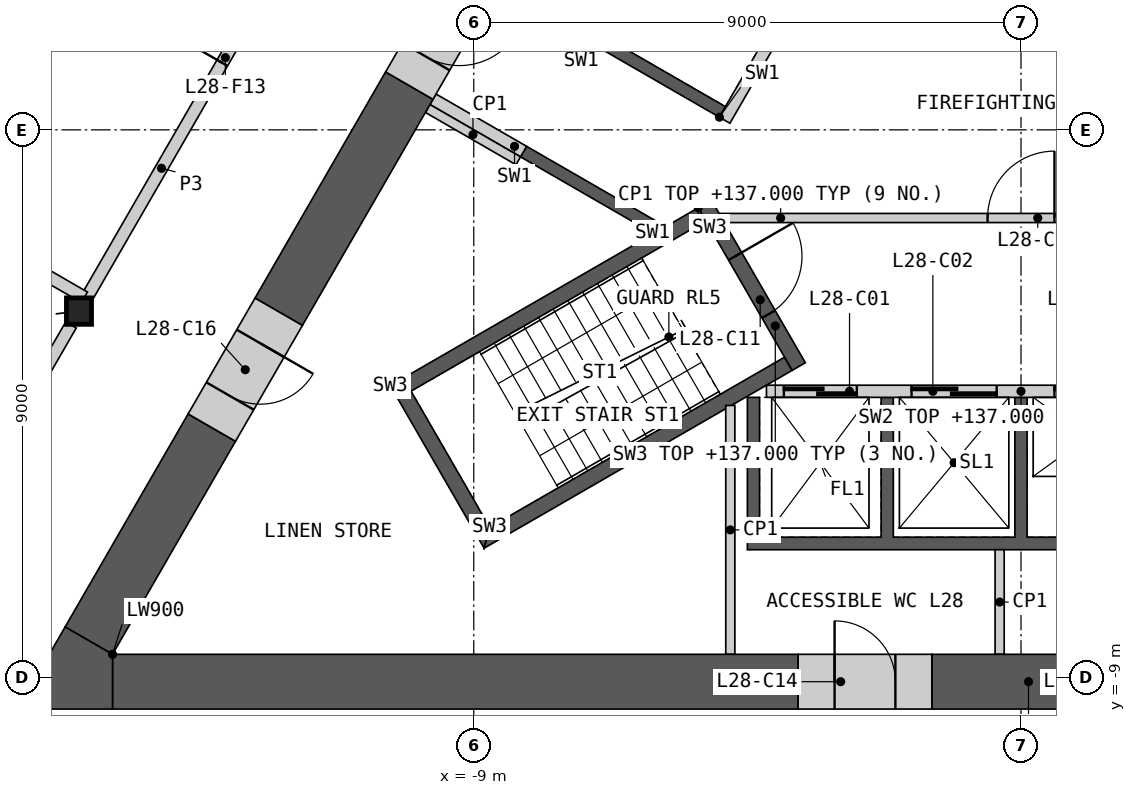
"""IFC4 building model, lengths in metres.
Left out: names, types, materials, properties, quantities, classifications, styles, units other than length and angle.
Written with IfcOpenShell. Run it as: python <this file> out.ifc"""

import sys

from ifc_helpers import new_model, si_unit, direction, frame, frame_2d, origin, origin_2d, place, context, subcontext, project, spatial, polyline, rectangle, i_section, outline, extrude, element, fill, save


model = new_model("IFC4")
c1 = context("Model", 3, precision=1e-05, world=origin(), true_north=direction((0.0, 1.0)))
c2 = subcontext(c1, "Body", "Model", "MODEL_VIEW")
j1 = project(units=[si_unit("LENGTHUNIT", "METRE"), si_unit("PLANEANGLEUNIT", "RADIAN")], contexts=[c1])
p1 = place(None, origin())
s1 = spatial("IfcSite", under=j1, at=p1, CompositionType="ELEMENT")
p2 = place(p1, origin())
s2 = spatial("IfcBuilding", under=s1, at=p2, CompositionType="ELEMENT")
p3 = place(p2, frame((0.0, 0.0, 133.2)))
s3 = spatial("IfcBuildingStorey", under=s2, at=p3, CompositionType="ELEMENT", Elevation=133.2)
p4 = place(p3, frame((-15.493, -2.982, 0.0), z_axis=(0.0, 0.0, 1.0), x_axis=(1.0, 0.0, 0.0)))
e1 = element("IfcColumn", 1, at=p4, inside=s3, PredefinedType="COLUMN", context=c2, shape_type="SweptSolid", body=[
    extrude(i_section(OverallWidth=0.412, OverallDepth=0.435, WebThickness=0.036, FlangeThickness=0.057, at=origin_2d()), origin(), (0.0, 0.0, 1.0), 4.2),
])
p5 = place(p3, origin())
e2 = element("IfcWall", 2, at=p5, inside=s3, PredefinedType="SHEAR", context=c2, shape_type="SweptSolid", body=[
    extrude(outline(polyline([(4.5, -4.4), (4.5, -6.906), (-4.5, -6.906), (-4.5, -4.4), (-4.3, -4.4), (-4.3, -6.7), (-2.3, -6.7), (-2.3, -4.4), (-2.1, -4.4), (-2.1, -6.7), (-0.1, -6.7), (-0.1, -4.4), (0.1, -4.4), (0.1, -6.7), (2.1, -6.7), (2.1, -4.4), (2.3, -4.4), (2.3, -6.7), (4.3, -6.7), (4.3, -4.4), (4.5, -4.4)])), origin(), (0.0, 0.0, 1.0), 3.8),
])
p6 = place(p3, frame((-4.187, -4.3, 0.0), z_axis=(0.0, 0.0, 1.0), x_axis=(1.0, 0.0, 0.0)))
e3 = element("IfcWall", 3, at=p6, inside=s3, PredefinedType="SOLIDWALL", context=c2, shape_type="SweptSolid", body=[
    extrude(rectangle(XDim=8.373, YDim=0.2, at=frame_2d((4.187, 0.0))), origin(), (0.0, 0.0, 1.0), 3.8),
])
p7 = place(p6, frame((0.287, 0.0, 0.0)))
e4 = element("IfcOpeningElement", 4, at=p7, cuts=e3, PredefinedType="OPENING", context=c2, shape_type="SweptSolid", body=[
    extrude(rectangle(XDim=1.2, YDim=2.1, at=frame_2d((0.6, 1.05))), frame((0.0, 0.11, 0.0), z_axis=(0.0, -1.0, 0.0), x_axis=(1.0, 0.0, 0.0)), (0.0, 0.0, 1.0), 0.22),
])
p8 = place(p6, frame((2.387, 0.0, 0.0)))
e5 = element("IfcOpeningElement", 5, at=p8, cuts=e3, PredefinedType="OPENING", context=c2, shape_type="SweptSolid", body=[
    extrude(rectangle(XDim=1.4, YDim=2.1, at=frame_2d((0.7, 1.05))), frame((0.0, 0.11, 0.0), z_axis=(0.0, -1.0, 0.0), x_axis=(1.0, 0.0, 0.0)), (0.0, 0.0, 1.0), 0.22),
])
p9 = place(p6, frame((4.737, 0.0, 0.0)))
e6 = element("IfcOpeningElement", 6, at=p9, cuts=e3, PredefinedType="OPENING", context=c2, shape_type="SweptSolid", body=[
    extrude(rectangle(XDim=1.1, YDim=2.1, at=frame_2d((0.55, 1.05))), frame((0.0, 0.11, 0.0), z_axis=(0.0, -1.0, 0.0), x_axis=(1.0, 0.0, 0.0)), (0.0, 0.0, 1.0), 0.22),
])
p10 = place(p6, frame((6.887, 0.0, 0.0)))
e7 = element("IfcOpeningElement", 7, at=p10, cuts=e3, PredefinedType="OPENING", context=c2, shape_type="SweptSolid", body=[
    extrude(rectangle(XDim=1.2, YDim=2.1, at=frame_2d((0.6, 1.05))), frame((0.0, 0.11, 0.0), z_axis=(0.0, -1.0, 0.0), x_axis=(1.0, 0.0, 0.0)), (0.0, 0.0, 1.0), 0.22),
])
p11 = place(p3, origin())
e8 = element("IfcWall", 8, at=p11, inside=s3, PredefinedType="SHEAR", context=c2, shape_type="SweptSolid", body=[
    extrude(outline(polyline([(-6.061, -1.697), (-8.231, -0.444), (-8.131, -0.271), (-5.96, -1.524), (-6.061, -1.697)])), origin(), (0.0, 0.0, 1.0), 3.8),
])
p12 = place(p3, origin())
e9 = element("IfcWall", 9, at=p12, inside=s3, PredefinedType="SHEAR", context=c2, shape_type="SweptSolid", body=[
    extrude(outline(polyline([(-4.96, 0.208), (-7.131, 1.461), (-3.731, 7.35), (-1.561, 6.097), (-1.66, 5.924), (-3.652, 7.074), (-5.752, 3.437), (-3.76, 2.287), (-3.861, 2.113), (-5.852, 3.263), (-6.852, 1.531), (-4.861, 0.381), (-4.96, 0.208)])), origin(), (0.0, 0.0, 1.0), 3.8),
])
p13 = place(p3, frame((-1.631, 5.776, 0.0), z_axis=(0.0, 0.0, 1.0), x_axis=(-0.499992876559, -0.866029516466, 0.0)))
e10 = element("IfcWall", 10, at=p13, inside=s3, PredefinedType="SOLIDWALL", context=c2, shape_type="SweptSolid", body=[
    extrude(rectangle(XDim=6.486, YDim=0.2, at=frame_2d((3.243, 0.0))), origin(), (0.0, 0.0, 1.0), 3.8),
])
p14 = place(p13, frame((1.537, 0.0, 0.0)))
e11 = element("IfcOpeningElement", 11, at=p14, cuts=e10, PredefinedType="OPENING", context=c2, shape_type="SweptSolid", body=[
    extrude(rectangle(XDim=0.9, YDim=2.1, at=frame_2d((0.45, 1.05))), frame((0.0, 0.11, 0.0), z_axis=(0.0, -1.0, 0.0), x_axis=(1.0, 0.0, 0.0)), (0.0, 0.0, 1.0), 0.22),
])
p15 = place(p3, frame((-8.181, -0.357, 0.0), z_axis=(0.0, 0.0, 1.0), x_axis=(-0.866024871741, 0.500000921525, 0.0)))
e12 = element("IfcWall", 12, at=p15, inside=s3, PredefinedType="SHEAR", context=c2, shape_type="SweptSolid", body=[
    extrude(rectangle(XDim=1.72, YDim=0.2, at=frame_2d((0.86, 0.0))), origin(), (0.0, 0.0, 1.0), 3.8),
])
p16 = place(p3, frame((-4.941, -1.45, 0.0), z_axis=(0.0, 0.0, 1.0), x_axis=(1.0, 0.0, 0.0)))
e13 = element("IfcWall", 13, at=p16, inside=s3, PredefinedType="PARTITIONING", context=c2, shape_type="SweptSolid", body=[
    extrude(rectangle(XDim=9.882, YDim=0.15, at=frame_2d((4.941, 0.0))), origin(), (0.0, 0.0, 1.0), 3.8),
])
p17 = place(p16, frame((4.391, 0.0, 0.0)))
e14 = element("IfcOpeningElement", 14, at=p17, cuts=e13, PredefinedType="OPENING", context=c2, shape_type="SweptSolid", body=[
    extrude(rectangle(XDim=1.1, YDim=2.1, at=frame_2d((0.55, 1.05))), frame((0.0, 0.085, 0.0), z_axis=(0.0, -1.0, 0.0), x_axis=(1.0, 0.0, 0.0)), (0.0, 0.0, 1.0), 0.17),
])
p18 = place(p3, origin())
e15 = element("IfcWall", 15, at=p18, inside=s3, PredefinedType="SHEAR", context=c2, shape_type="SweptSolid", body=[
    extrude(outline(polyline([(-5.307, -1.281), (-10.374, -4.206), (-10.032, -4.298), (-5.182, -1.498), (-5.307, -1.281)])), origin(), (0.0, 0.0, 1.0), 3.8),
])
p19 = place(p3, origin())
e16 = element("IfcWall", 16, at=p19, inside=s3, PredefinedType="SHEAR", context=c2, shape_type="SweptSolid", body=[
    extrude(outline(polyline([(-10.374, -4.206), (-8.83, -6.881), (-8.738, -6.539), (-10.032, -4.298), (-10.374, -4.206)])), origin(), (0.0, 0.0, 1.0), 3.8),
])
p20 = place(p3, origin())
e17 = element("IfcWall", 17, at=p20, inside=s3, PredefinedType="SHEAR", context=c2, shape_type="SweptSolid", body=[
    extrude(outline(polyline([(-8.738, -6.539), (-8.83, -6.881), (-3.763, -3.956), (-3.888, -3.739), (-8.738, -6.539)])), origin(), (0.0, 0.0, 1.0), 3.8),
])
p21 = place(p3, frame((-5.199, -1.219, 0.0), z_axis=(0.0, 0.0, 1.0), x_axis=(0.499982516597, -0.866035497597, 0.0)))
e18 = element("IfcWall", 18, at=p21, inside=s3, PredefinedType="SHEAR", context=c2, shape_type="SweptSolid", body=[
    extrude(rectangle(XDim=3.088, YDim=0.25, at=frame_2d((1.544, 0.0))), origin(), (0.0, 0.0, 1.0), 3.8),
])
p22 = place(p21, frame((0.994, 0.0, 0.0)))
e19 = element("IfcOpeningElement", 19, at=p22, cuts=e18, PredefinedType="OPENING", context=c2, shape_type="SweptSolid", body=[
    extrude(rectangle(XDim=1.1, YDim=2.1, at=frame_2d((0.55, 1.05))), frame((0.0, 0.135, 0.0), z_axis=(0.0, -1.0, 0.0), x_axis=(1.0, 0.0, 0.0)), (0.0, 0.0, 1.0), 0.27),
])
for number, where, z_axis, x_axis in (
    (20, (-8.268, -0.509, 0.0), (0.0, 0.0, 1.0), (-0.866, 0.5, 0.0)),
    (21, (-0.351, -8.626, 0.0), (0.0, 0.0, 1.0), (0.0, 1.0, 0.0)),
):
    element("IfcWall", number, at=place(p3, frame(where, z_axis=z_axis, x_axis=x_axis)), inside=s3, PredefinedType="PARTITIONING", context=c2, shape_type="SweptSolid", body=[
        extrude(rectangle(XDim=1.72, YDim=0.15, at=frame_2d((0.86, 0.0))), origin(), (0.0, 0.0, 1.0), 3.8),
    ])
p23 = place(p3, frame((-4.781, -8.626, 0.0), z_axis=(0.0, 0.0, 1.0), x_axis=(0.0, 1.0, 0.0)))
e22 = element("IfcWall", 22, at=p23, inside=s3, PredefinedType="PARTITIONING", context=c2, shape_type="SweptSolid", body=[
    extrude(rectangle(XDim=4.093, YDim=0.15, at=frame_2d((2.047, 0.0))), origin(), (0.0, 0.0, 1.0), 3.8),
])
p24 = place(p3, frame((-14.941, -9.076, 0.0), z_axis=(0.0, 0.0, 1.0), x_axis=(1.0, 0.0, 0.0)))
e23 = element("IfcWall", 23, at=p24, inside=s3, PredefinedType="SHEAR", context=c2, shape_type="SweptSolid", body=[
    extrude(rectangle(XDim=11.275, YDim=0.9, at=frame_2d((5.638, 0.0))), origin(), (0.0, 0.0, 1.0), 3.8),
])
p25 = place(p3, frame((-1.466, -9.076, 0.0), z_axis=(0.0, 0.0, 1.0), x_axis=(1.0, 0.0, 0.0)))
e24 = element("IfcWall", 24, at=p25, inside=s3, PredefinedType="SHEAR", context=c2, shape_type="SweptSolid", body=[
    extrude(rectangle(XDim=3.179, YDim=0.9, at=frame_2d((1.589, 0.0))), origin(), (0.0, 0.0, 1.0), 3.8),
])
p26 = place(p3, frame((-10.06, 0.728, 0.0), z_axis=(0.0, 0.0, 1.0), x_axis=(-0.499996331799, -0.866027521611, 0.0)))
e25 = element("IfcWall", 25, at=p26, inside=s3, PredefinedType="SHEAR", context=c2, shape_type="SweptSolid", body=[
    extrude(rectangle(XDim=4.295, YDim=0.9, at=frame_2d((2.148, 0.0))), origin(), (0.0, 0.0, 1.0), 3.8),
])
p27 = place(p3, frame((-13.308, -4.898, 0.0), z_axis=(0.0, 0.0, 1.0), x_axis=(-0.499974938593, -0.866039872511, 0.0)))
e26 = element("IfcWall", 26, at=p27, inside=s3, PredefinedType="SHEAR", context=c2, shape_type="SweptSolid", body=[
    extrude(rectangle(XDim=4.046, YDim=0.9, at=frame_2d((2.023, 0.0))), origin(), (0.0, 0.0, 1.0), 3.8),
])
p28 = place(p3, origin())
e27 = element("IfcWall", 27, at=p28, inside=s3, PredefinedType="SHEAR", context=c2, shape_type="SweptSolid", body=[
    extrude(outline(polyline([(-14.941, -8.626), (-14.941, -9.526), (-16.5, -9.526), (-15.721, -8.176), (-14.941, -8.626)])), origin(), (0.0, 0.0, 1.0), 3.8),
])
p29 = place(p3, frame((-3.666, -9.076, 0.0), z_axis=(0.0, 0.0, 1.0), x_axis=(1.0, 0.0, 0.0)))
e28 = element("IfcWall", 28, at=p29, inside=s3, PredefinedType="SHEAR", context=c2, shape_type="SweptSolid", body=[
    extrude(rectangle(XDim=2.2, YDim=0.9, at=frame_2d((1.1, 0.0))), origin(), (0.0, 0.0, 1.0), 3.8),
])
p30 = place(p29, frame((0.6, 0.0, 0.0)))
e29 = element("IfcOpeningElement", 29, at=p30, cuts=e28, PredefinedType="OPENING", context=c2, shape_type="SweptSolid", body=[
    extrude(rectangle(XDim=1.0, YDim=2.1, at=frame_2d((0.5, 1.05))), frame((0.0, 0.46, 0.0), z_axis=(0.0, -1.0, 0.0), x_axis=(1.0, 0.0, 0.0)), (0.0, 0.0, 1.0), 0.92),
])
p31 = place(p3, frame((-12.208, -2.992, 0.0), z_axis=(0.0, 0.0, 1.0), x_axis=(-0.50002983664, -0.866008176907, 0.0)))
e30 = element("IfcWall", 30, at=p31, inside=s3, PredefinedType="SHEAR", context=c2, shape_type="SweptSolid", body=[
    extrude(rectangle(XDim=2.2, YDim=0.9, at=frame_2d((1.1, 0.0))), origin(), (0.0, 0.0, 1.0), 3.8),
])
p32 = place(p31, frame((0.6, 0.0, 0.0)))
e31 = element("IfcOpeningElement", 31, at=p32, cuts=e30, PredefinedType="OPENING", context=c2, shape_type="SweptSolid", body=[
    extrude(rectangle(XDim=1.0, YDim=2.1, at=frame_2d((0.5, 1.05))), frame((0.0, 0.46, 0.0), z_axis=(0.0, -1.0, 0.0), x_axis=(1.0, 0.0, 0.0)), (0.0, 0.0, 1.0), 0.92),
])
p33 = place(p3, frame((-8.96, 2.633, 0.0), z_axis=(0.0, 0.0, 1.0), x_axis=(-0.50002983664, -0.866008176907, 0.0)))
e32 = element("IfcWall", 32, at=p33, inside=s3, PredefinedType="SHEAR", context=c2, shape_type="SweptSolid", body=[
    extrude(rectangle(XDim=2.2, YDim=0.9, at=frame_2d((1.1, 0.0))), origin(), (0.0, 0.0, 1.0), 3.8),
])
p34 = place(p33, frame((0.55, 0.0, 0.0)))
e33 = element("IfcOpeningElement", 33, at=p34, cuts=e32, PredefinedType="OPENING", context=c2, shape_type="SweptSolid", body=[
    extrude(rectangle(XDim=1.1, YDim=2.1, at=frame_2d((0.55, 1.05))), frame((0.0, 0.46, 0.0), z_axis=(0.0, -1.0, 0.0), x_axis=(1.0, 0.0, 0.0)), (0.0, 0.0, 1.0), 0.92),
])
p35 = place(p3, frame((-15.361, -2.754, 0.0), z_axis=(0.0, 0.0, 1.0), x_axis=(0.500004141693, 0.866023012564, 0.0)))
e34 = element("IfcWall", 34, at=p35, inside=s3, PredefinedType="PARTITIONING", context=c2, shape_type="SweptSolid", body=[
    extrude(rectangle(XDim=9.803, YDim=0.2, at=frame_2d((4.902, 0.0))), origin(), (0.0, 0.0, 1.0), 3.8),
])
p36 = place(p35, frame((4.452, 0.0, 0.0)))
e35 = element("IfcOpeningElement", 35, at=p36, cuts=e34, PredefinedType="OPENING", context=c2, shape_type="SweptSolid", body=[
    extrude(rectangle(XDim=1.0, YDim=2.1, at=frame_2d((0.5, 1.05))), frame((0.0, 0.11, 0.0), z_axis=(0.0, -1.0, 0.0), x_axis=(1.0, 0.0, 0.0)), (0.0, 0.0, 1.0), 0.22),
])
p37 = place(p3, frame((-18.744, -8.613, 0.0), z_axis=(0.0, 0.0, 1.0), x_axis=(0.499997920671, 0.866026604282, 0.0)))
e36 = element("IfcWall", 36, at=p37, inside=s3, PredefinedType="PARTITIONING", context=c2, shape_type="SweptSolid", body=[
    extrude(rectangle(XDim=6.24, YDim=0.2, at=frame_2d((3.12, 0.0))), origin(), (0.0, 0.0, 1.0), 3.8),
])
p38 = place(p37, frame((2.67, 0.0, 0.0)))
e37 = element("IfcOpeningElement", 37, at=p38, cuts=e36, PredefinedType="OPENING", context=c2, shape_type="SweptSolid", body=[
    extrude(rectangle(XDim=1.0, YDim=2.1, at=frame_2d((0.5, 1.05))), frame((0.0, 0.11, 0.0), z_axis=(0.0, -1.0, 0.0), x_axis=(1.0, 0.0, 0.0)), (0.0, 0.0, 1.0), 0.22),
])
p39 = place(p3, frame((-26.636, 3.731, 0.0), z_axis=(0.0, 0.0, 1.0), x_axis=(0.866024473704, -0.500001610943, 0.0)))
e38 = element("IfcWall", 38, at=p39, inside=s3, PredefinedType="PARTITIONING", context=c2, shape_type="SweptSolid", body=[
    extrude(rectangle(XDim=12.971, YDim=0.2, at=frame_2d((6.485, 0.0))), origin(), (0.0, 0.0, 1.0), 2.885),
])
p40 = place(p7, origin())
e39 = element("IfcDoor", 39, at=p40, inside=s3, OperationType="SLIDING_TO_LEFT", PredefinedType="DOOR", context=c2, shape_type="SweptSolid", body=[
    extrude(rectangle(XDim=1.2, YDim=2.1, at=frame_2d((0.6, 1.05))), frame((0.0, 0.025, 0.0), z_axis=(0.0, -1.0, 0.0), x_axis=(1.0, 0.0, 0.0)), (0.0, 0.0, 1.0), 0.05),
])
fill(e4, e39)
p41 = place(p8, origin())
e40 = element("IfcDoor", 40, at=p41, inside=s3, OperationType="SLIDING_TO_LEFT", PredefinedType="DOOR", context=c2, shape_type="SweptSolid", body=[
    extrude(rectangle(XDim=1.4, YDim=2.1, at=frame_2d((0.7, 1.05))), frame((0.0, 0.025, 0.0), z_axis=(0.0, -1.0, 0.0), x_axis=(1.0, 0.0, 0.0)), (0.0, 0.0, 1.0), 0.05),
])
fill(e5, e40)
p42 = place(p9, origin())
e41 = element("IfcDoor", 41, at=p42, inside=s3, OperationType="SLIDING_TO_LEFT", PredefinedType="DOOR", context=c2, shape_type="SweptSolid", body=[
    extrude(rectangle(XDim=1.1, YDim=2.1, at=frame_2d((0.55, 1.05))), frame((0.0, 0.025, 0.0), z_axis=(0.0, -1.0, 0.0), x_axis=(1.0, 0.0, 0.0)), (0.0, 0.0, 1.0), 0.05),
])
fill(e6, e41)
p43 = place(p17, origin())
e42 = element("IfcDoor", 42, at=p43, inside=s3, OperationType="SINGLE_SWING_RIGHT", PredefinedType="DOOR", context=c2, shape_type="SweptSolid", body=[
    extrude(rectangle(XDim=1.1, YDim=2.1, at=frame_2d((0.55, 1.05))), frame((0.0, 0.025, 0.0), z_axis=(0.0, -1.0, 0.0), x_axis=(1.0, 0.0, 0.0)), (0.0, 0.0, 1.0), 0.05),
])
fill(e14, e42)
p44 = place(p22, origin())
e43 = element("IfcDoor", 43, at=p44, inside=s3, OperationType="SINGLE_SWING_LEFT", PredefinedType="DOOR", context=c2, shape_type="SweptSolid", body=[
    extrude(rectangle(XDim=1.1, YDim=2.1, at=frame_2d((0.55, 1.05))), frame((0.0, 0.025, 0.0), z_axis=(0.0, -1.0, 0.0), x_axis=(1.0, 0.0, 0.0)), (0.0, 0.0, 1.0), 0.05),
])
fill(e19, e43)
p45 = place(p30, origin())
e44 = element("IfcDoor", 44, at=p45, inside=s3, OperationType="SINGLE_SWING_LEFT", PredefinedType="DOOR", context=c2, shape_type="SweptSolid", body=[
    extrude(rectangle(XDim=1.0, YDim=2.1, at=frame_2d((0.5, 1.05))), frame((0.0, 0.205, 0.0), z_axis=(0.0, -1.0, 0.0), x_axis=(1.0, 0.0, 0.0)), (0.0, 0.0, 1.0), 0.05),
])
fill(e29, e44)
p46 = place(p32, origin())
e45 = element("IfcDoor", 45, at=p46, inside=s3, OperationType="SINGLE_SWING_LEFT", PredefinedType="DOOR", context=c2, shape_type="SweptSolid", body=[
    extrude(rectangle(XDim=1.0, YDim=2.1, at=frame_2d((0.5, 1.05))), frame((0.0, 0.205, 0.0), z_axis=(0.0, -1.0, 0.0), x_axis=(1.0, 0.0, 0.0)), (0.0, 0.0, 1.0), 0.05),
])
fill(e31, e45)
p47 = place(p34, origin())
e46 = element("IfcDoor", 46, at=p47, inside=s3, OperationType="SINGLE_SWING_LEFT", PredefinedType="DOOR", context=c2, shape_type="SweptSolid", body=[
    extrude(rectangle(XDim=1.1, YDim=2.1, at=frame_2d((0.55, 1.05))), frame((0.0, 0.205, 0.0), z_axis=(0.0, -1.0, 0.0), x_axis=(1.0, 0.0, 0.0)), (0.0, 0.0, 1.0), 0.05),
])
fill(e33, e46)
p48 = place(p36, origin())
e47 = element("IfcDoor", 47, at=p48, inside=s3, OperationType="SINGLE_SWING_LEFT", PredefinedType="DOOR", context=c2, shape_type="SweptSolid", body=[
    extrude(rectangle(XDim=1.0, YDim=2.1, at=frame_2d((0.5, 1.05))), frame((0.0, 0.025, 0.0), z_axis=(0.0, -1.0, 0.0), x_axis=(1.0, 0.0, 0.0)), (0.0, 0.0, 1.0), 0.05),
])
fill(e35, e47)
save(model, sys.argv[1])
